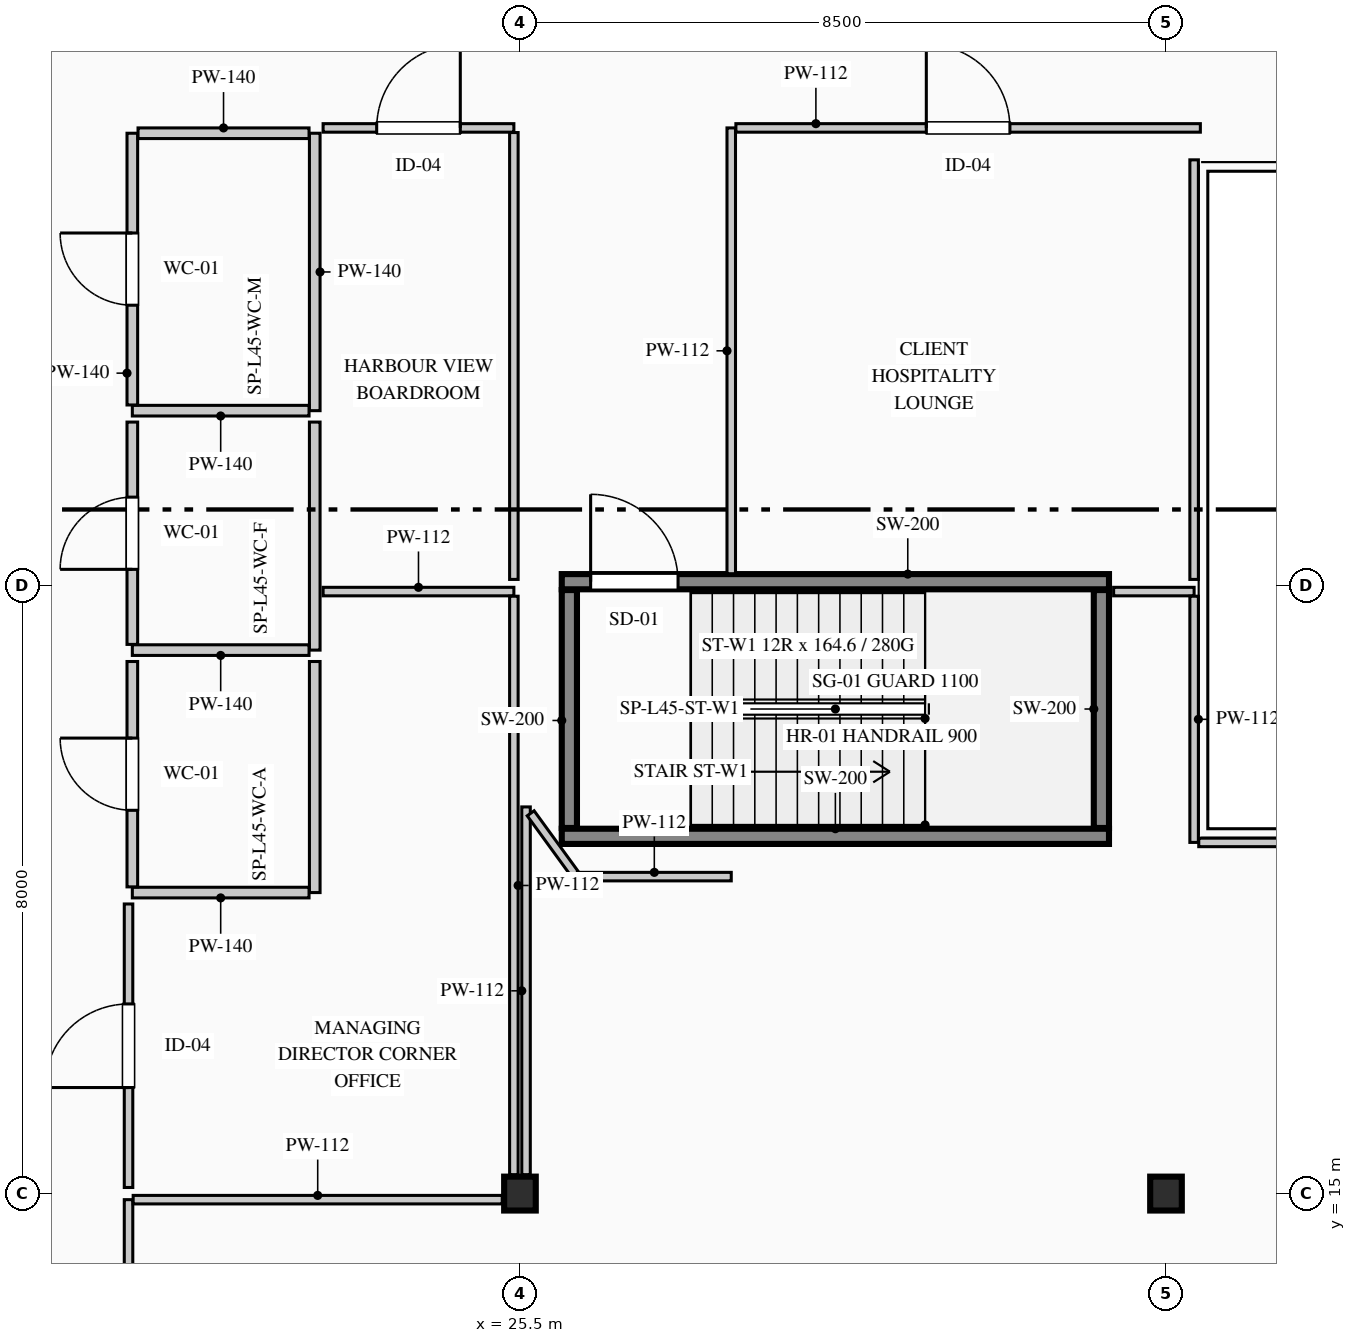
"""IFC4 building model, lengths in metres.
Left out: names, types, materials, properties, quantities, classifications, styles, units other than length and angle.
Written with IfcOpenShell. Run it as: python <this file> out.ifc"""

import sys

from ifc_helpers import new_model, si_unit, direction, frame, frame_2d, origin, origin_2d, place, context, subcontext, project, spatial, rectangle, i_section, extrude, element, fill, save


model = new_model("IFC4")
c1 = context("Model", 3, precision=1e-05, world=origin(), true_north=direction((0.0, 1.0)))
c2 = subcontext(c1, "Body", "Model", "MODEL_VIEW")
j1 = project(units=[si_unit("LENGTHUNIT", "METRE"), si_unit("PLANEANGLEUNIT", "RADIAN")], contexts=[c1])
p1 = place(None, origin())
s1 = spatial("IfcSite", under=j1, at=p1, CompositionType="ELEMENT")
p2 = place(p1, origin())
s2 = spatial("IfcBuilding", under=s1, at=p2, CompositionType="ELEMENT")
p3 = place(p2, frame((0.0, 0.0, 191.65)))
s3 = spatial("IfcBuildingStorey", under=s2, at=p3, CompositionType="ELEMENT", Elevation=191.65)
p4 = place(p3, frame((26.05, 19.7, 0.0), z_axis=(0.0, 0.0, 1.0), x_axis=(1.0, 0.0, 0.0)))
e1 = element("IfcWall", 1, at=p4, inside=s3, PredefinedType="SHEAR", context=c2, shape_type="SweptSolid", body=[
    extrude(rectangle(XDim=7.2, YDim=0.2, at=frame_2d((3.6, 0.0))), origin(), (0.0, 0.0, 1.0), 3.95),
])
p5 = place(p3, frame((26.05, 23.05, 0.0), z_axis=(0.0, 0.0, 1.0), x_axis=(1.0, 0.0, 0.0)))
e2 = element("IfcWall", 2, at=p5, inside=s3, PredefinedType="SHEAR", context=c2, shape_type="SweptSolid", body=[
    extrude(rectangle(XDim=7.2, YDim=0.2, at=frame_2d((3.6, 0.0))), origin(), (0.0, 0.0, 1.0), 3.95),
])
p6 = place(p5, frame((0.38, 0.0, 0.0)))
e3 = element("IfcOpeningElement", 3, at=p6, cuts=e2, PredefinedType="OPENING", context=c2, shape_type="SweptSolid", body=[
    extrude(rectangle(XDim=1.15, YDim=2.2, at=frame_2d((0.575, 1.1))), frame((0.0, 0.11, 0.0), z_axis=(0.0, -1.0, 0.0), x_axis=(1.0, 0.0, 0.0)), (0.0, 0.0, 1.0), 0.22),
])
for number, where, z_axis, x_axis in (
    (4, (26.15, 19.81, 0.0), (0.0, 0.0, 1.0), (0.0, 1.0, 0.0)),
    (5, (33.15, 19.81, 0.0), (0.0, 0.0, 1.0), (0.0, 1.0, 0.0)),
):
    element("IfcWall", number, at=place(p3, frame(where, z_axis=z_axis, x_axis=x_axis)), inside=s3, PredefinedType="SHEAR", context=c2, shape_type="SweptSolid", body=[
        extrude(rectangle(XDim=3.13, YDim=0.2, at=frame_2d((1.565, 0.0))), origin(), (0.0, 0.0, 1.0), 3.95),
    ])
for number, where, z_axis, x_axis in (
    (6, (25.5, 15.0, 0.0), (0.0, 0.0, 1.0), (1.0, 0.0, 0.0)),
    (7, (34.0, 15.0, 0.0), (0.0, 0.0, 1.0), (1.0, 0.0, 0.0)),
):
    element("IfcColumn", number, at=place(p3, frame(where, z_axis=z_axis, x_axis=x_axis)), inside=s3, PredefinedType="COLUMN", context=c2, shape_type="SweptSolid", body=[
        extrude(i_section(OverallWidth=0.416, OverallDepth=0.446, WebThickness=0.039, FlangeThickness=0.063, FilletRadius=0.015, at=origin_2d()), origin(), (0.0, 0.0, 1.0), 3.95),
    ])
p7 = place(p3, frame((22.8, 28.95, 0.0), z_axis=(0.0, 0.0, 1.0), x_axis=(0.0, -1.0, 0.0)))
e8 = element("IfcWall", 8, at=p7, inside=s3, PredefinedType="PARTITIONING", context=c2, shape_type="SweptSolid", body=[
    extrude(rectangle(XDim=3.65, YDim=0.14, at=frame_2d((1.825, 0.0))), origin(), (0.0, 0.0, 1.0), 3.385),
])
p8 = place(p3, frame((22.725, 25.3, 0.0), z_axis=(0.0, 0.0, 1.0), x_axis=(-1.0, 0.0, 0.0)))
e9 = element("IfcWall", 9, at=p8, inside=s3, PredefinedType="PARTITIONING", context=c2, shape_type="SweptSolid", body=[
    extrude(rectangle(XDim=2.325, YDim=0.14, at=frame_2d((1.163, 0.0))), origin(), (0.0, 0.0, 1.0), 3.7),
])
p9 = place(p3, frame((20.4, 25.375, 0.0), z_axis=(0.0, 0.0, 1.0), x_axis=(0.0, 1.0, 0.0)))
e10 = element("IfcWall", 10, at=p9, inside=s3, PredefinedType="PARTITIONING", context=c2, shape_type="SweptSolid", body=[
    extrude(rectangle(XDim=3.575, YDim=0.14, at=frame_2d((1.788, 0.0))), origin(), (0.0, 0.0, 1.0), 3.7),
])
p10 = place(p9, frame((1.312, 0.0, 0.0)))
e11 = element("IfcOpeningElement", 11, at=p10, cuts=e10, PredefinedType="OPENING", context=c2, shape_type="SweptSolid", body=[
    extrude(rectangle(XDim=0.95, YDim=2.15, at=frame_2d((0.475, 1.075))), frame((0.0, 0.08, 0.0), z_axis=(0.0, -1.0, 0.0), x_axis=(1.0, 0.0, 0.0)), (0.0, 0.0, 1.0), 0.16),
])
p11 = place(p3, frame((20.475, 28.95, 0.0), z_axis=(0.0, 0.0, 1.0), x_axis=(1.0, 0.0, 0.0)))
e12 = element("IfcWall", 12, at=p11, inside=s3, PredefinedType="PARTITIONING", context=c2, shape_type="SweptSolid", body=[
    extrude(rectangle(XDim=2.25, YDim=0.14, at=frame_2d((1.125, 0.0))), origin(), (0.0, 0.0, 1.0), 3.7),
])
p12 = place(p3, frame((22.8, 25.15, 0.0), z_axis=(0.0, 0.0, 1.0), x_axis=(0.0, -1.0, 0.0)))
e13 = element("IfcWall", 13, at=p12, inside=s3, PredefinedType="PARTITIONING", context=c2, shape_type="SweptSolid", body=[
    extrude(rectangle(XDim=3.0, YDim=0.14, at=frame_2d((1.5, 0.0))), origin(), (0.0, 0.0, 1.0), 3.385),
])
p13 = place(p3, frame((22.725, 22.15, 0.0), z_axis=(0.0, 0.0, 1.0), x_axis=(-1.0, 0.0, 0.0)))
e14 = element("IfcWall", 14, at=p13, inside=s3, PredefinedType="PARTITIONING", context=c2, shape_type="SweptSolid", body=[
    extrude(rectangle(XDim=2.325, YDim=0.14, at=frame_2d((1.163, 0.0))), origin(), (0.0, 0.0, 1.0), 3.7),
])
p14 = place(p3, frame((20.4, 22.225, 0.0), z_axis=(0.0, 0.0, 1.0), x_axis=(0.0, 1.0, 0.0)))
e15 = element("IfcWall", 15, at=p14, inside=s3, PredefinedType="PARTITIONING", context=c2, shape_type="SweptSolid", body=[
    extrude(rectangle(XDim=2.925, YDim=0.14, at=frame_2d((1.462, 0.0))), origin(), (0.0, 0.0, 1.0), 3.7),
])
p15 = place(p14, frame((0.988, 0.0, 0.0)))
e16 = element("IfcOpeningElement", 16, at=p15, cuts=e15, PredefinedType="OPENING", context=c2, shape_type="SweptSolid", body=[
    extrude(rectangle(XDim=0.95, YDim=2.15, at=frame_2d((0.475, 1.075))), frame((0.0, 0.08, 0.0), z_axis=(0.0, -1.0, 0.0), x_axis=(1.0, 0.0, 0.0)), (0.0, 0.0, 1.0), 0.16),
])
p16 = place(p3, frame((22.8, 22.0, 0.0), z_axis=(0.0, 0.0, 1.0), x_axis=(0.0, -1.0, 0.0)))
e17 = element("IfcWall", 17, at=p16, inside=s3, PredefinedType="PARTITIONING", context=c2, shape_type="SweptSolid", body=[
    extrude(rectangle(XDim=3.04, YDim=0.14, at=frame_2d((1.52, 0.0))), origin(), (0.0, 0.0, 1.0), 3.385),
])
p17 = place(p3, frame((22.725, 18.96, 0.0), z_axis=(0.0, 0.0, 1.0), x_axis=(-1.0, 0.0, 0.0)))
e18 = element("IfcWall", 18, at=p17, inside=s3, PredefinedType="PARTITIONING", context=c2, shape_type="SweptSolid", body=[
    extrude(rectangle(XDim=2.325, YDim=0.14, at=frame_2d((1.163, 0.0))), origin(), (0.0, 0.0, 1.0), 3.7),
])
p18 = place(p3, frame((20.4, 19.035, 0.0), z_axis=(0.0, 0.0, 1.0), x_axis=(0.0, 1.0, 0.0)))
e19 = element("IfcWall", 19, at=p18, inside=s3, PredefinedType="PARTITIONING", context=c2, shape_type="SweptSolid", body=[
    extrude(rectangle(XDim=2.965, YDim=0.14, at=frame_2d((1.482, 0.0))), origin(), (0.0, 0.0, 1.0), 3.7),
])
p19 = place(p18, frame((1.008, 0.0, 0.0)))
e20 = element("IfcOpeningElement", 20, at=p19, cuts=e19, PredefinedType="OPENING", context=c2, shape_type="SweptSolid", body=[
    extrude(rectangle(XDim=0.95, YDim=2.15, at=frame_2d((0.475, 1.075))), frame((0.0, 0.08, 0.0), z_axis=(0.0, -1.0, 0.0), x_axis=(1.0, 0.0, 0.0)), (0.0, 0.0, 1.0), 0.16),
])
p20 = place(p3, frame((20.35, 11.831, 0.0), z_axis=(0.0, 0.0, 1.0), x_axis=(0.0, 1.0, 0.0)))
e21 = element("IfcWall", 21, at=p20, inside=s3, PredefinedType="PARTITIONING", context=c2, shape_type="SweptSolid", body=[
    extrude(rectangle(XDim=3.089, YDim=0.112, at=frame_2d((1.544, 0.0))), origin(), (0.0, 0.0, 1.0), 3.7),
])
p21 = place(p3, frame((20.411, 14.92, 0.0), z_axis=(0.0, 0.0, 1.0), x_axis=(1.0, 0.0, 0.0)))
e22 = element("IfcWall", 22, at=p21, inside=s3, PredefinedType="PARTITIONING", context=c2, shape_type="SweptSolid", body=[
    extrude(rectangle(XDim=4.856, YDim=0.112, at=frame_2d((2.428, 0.0))), origin(), (0.0, 0.0, 1.0), 3.085),
])
p22 = place(p3, frame((25.58, 15.248, 0.0), z_axis=(0.0, 0.0, 1.0), x_axis=(0.0, 1.0, 0.0)))
e23 = element("IfcWall", 23, at=p22, inside=s3, PredefinedType="PARTITIONING", context=c2, shape_type="SweptSolid", body=[
    extrude(rectangle(XDim=4.839, YDim=0.112, at=frame_2d((2.419, 0.0))), origin(), (0.0, 0.0, 1.0), 2.885),
])
p23 = place(p3, frame((25.641, 20.003, 0.0), z_axis=(0.0, 0.0, 1.0), x_axis=(0.588143517869, -0.808756577957, 0.0)))
e24 = element("IfcWall", 24, at=p23, inside=s3, PredefinedType="PARTITIONING", context=c2, shape_type="SweptSolid", body=[
    extrude(rectangle(XDim=1.03, YDim=0.112, at=frame_2d((0.515, 0.0))), origin(), (0.0, 0.0, 1.0), 3.7),
])
p24 = place(p3, frame((26.256, 19.17, 0.0), z_axis=(0.0, 0.0, 1.0), x_axis=(1.0, 0.0, 0.0)))
e25 = element("IfcWall", 25, at=p24, inside=s3, PredefinedType="PARTITIONING", context=c2, shape_type="SweptSolid", body=[
    extrude(rectangle(XDim=2.024, YDim=0.112, at=frame_2d((1.012, 0.0))), origin(), (0.0, 0.0, 1.0), 3.385),
])
p25 = place(p3, frame((33.311, 22.92, 0.0), z_axis=(0.0, 0.0, 1.0), x_axis=(1.0, 0.0, 0.0)))
e26 = element("IfcWall", 26, at=p25, inside=s3, PredefinedType="PARTITIONING", context=c2, shape_type="SweptSolid", body=[
    extrude(rectangle(XDim=1.059, YDim=0.112, at=frame_2d((0.53, 0.0))), origin(), (0.0, 0.0, 1.0), 3.7),
])
p26 = place(p3, frame((34.37, 22.859, 0.0), z_axis=(0.0, 0.0, 1.0), x_axis=(0.0, -1.0, 0.0)))
e27 = element("IfcWall", 27, at=p26, inside=s3, PredefinedType="PARTITIONING", context=c2, shape_type="SweptSolid", body=[
    extrude(rectangle(XDim=3.239, YDim=0.112, at=frame_2d((1.619, 0.0))), origin(), (0.0, 0.0, 1.0), 3.7),
])
p27 = place(p3, frame((34.431, 19.62, 0.0), z_axis=(0.0, 0.0, 1.0), x_axis=(1.0, 0.0, 0.0)))
e28 = element("IfcWall", 28, at=p27, inside=s3, PredefinedType="PARTITIONING", context=c2, shape_type="SweptSolid", body=[
    extrude(rectangle(XDim=8.726, YDim=0.112, at=frame_2d((4.363, 0.0))), origin(), (0.0, 0.0, 1.0), 3.7),
])
p28 = place(p3, frame((22.91, 22.92, 0.0), z_axis=(0.0, 0.0, 1.0), x_axis=(1.0, 0.0, 0.0)))
e29 = element("IfcWall", 29, at=p28, inside=s3, PredefinedType="PARTITIONING", context=c2, shape_type="SweptSolid", body=[
    extrude(rectangle(XDim=2.51, YDim=0.112, at=frame_2d((1.255, 0.0))), origin(), (0.0, 0.0, 1.0), 3.7),
])
p29 = place(p3, frame((25.42, 22.859, 0.0), z_axis=(0.0, 0.0, 1.0), x_axis=(0.0, -1.0, 0.0)))
e30 = element("IfcWall", 30, at=p29, inside=s3, PredefinedType="PARTITIONING", context=c2, shape_type="SweptSolid", body=[
    extrude(rectangle(XDim=7.611, YDim=0.112, at=frame_2d((3.805, 0.0))), origin(), (0.0, 0.0, 1.0), 2.885),
])
p30 = place(p3, frame((20.35, 15.08, 0.0), z_axis=(0.0, 0.0, 1.0), x_axis=(0.0, 1.0, 0.0)))
e31 = element("IfcWall", 31, at=p30, inside=s3, PredefinedType="PARTITIONING", context=c2, shape_type="SweptSolid", body=[
    extrude(rectangle(XDim=3.73, YDim=0.112, at=frame_2d((1.865, 0.0))), origin(), (0.0, 0.0, 1.0), 3.7),
])
p31 = place(p30, frame((1.315, 0.0, 0.0)))
e32 = element("IfcOpeningElement", 32, at=p31, cuts=e31, PredefinedType="OPENING", context=c2, shape_type="SweptSolid", body=[
    extrude(rectangle(XDim=1.1, YDim=2.2, at=frame_2d((0.55, 1.1))), frame((0.0, 0.066, 0.0), z_axis=(0.0, -1.0, 0.0), x_axis=(1.0, 0.0, 0.0)), (0.0, 0.0, 1.0), 0.132),
])
p32 = place(p3, frame((22.91, 29.02, 0.0), z_axis=(0.0, 0.0, 1.0), x_axis=(1.0, 0.0, 0.0)))
e33 = element("IfcWall", 33, at=p32, inside=s3, PredefinedType="PARTITIONING", context=c2, shape_type="SweptSolid", body=[
    extrude(rectangle(XDim=2.51, YDim=0.112, at=frame_2d((1.255, 0.0))), origin(), (0.0, 0.0, 1.0), 3.7),
])
p33 = place(p32, frame((0.705, 0.0, 0.0)))
e34 = element("IfcOpeningElement", 34, at=p33, cuts=e33, PredefinedType="OPENING", context=c2, shape_type="SweptSolid", body=[
    extrude(rectangle(XDim=1.1, YDim=2.2, at=frame_2d((0.55, 1.1))), frame((0.0, 0.066, 0.0), z_axis=(0.0, -1.0, 0.0), x_axis=(1.0, 0.0, 0.0)), (0.0, 0.0, 1.0), 0.132),
])
p34 = place(p3, frame((25.42, 28.959, 0.0), z_axis=(0.0, 0.0, 1.0), x_axis=(0.0, -1.0, 0.0)))
e35 = element("IfcWall", 35, at=p34, inside=s3, PredefinedType="PARTITIONING", context=c2, shape_type="SweptSolid", body=[
    extrude(rectangle(XDim=5.879, YDim=0.112, at=frame_2d((2.939, 0.0))), origin(), (0.0, 0.0, 1.0), 2.885),
])
p35 = place(p3, frame((34.37, 28.6, 0.0), z_axis=(0.0, 0.0, 1.0), x_axis=(0.0, -1.0, 0.0)))
e36 = element("IfcWall", 36, at=p35, inside=s3, PredefinedType="PARTITIONING", context=c2, shape_type="SweptSolid", body=[
    extrude(rectangle(XDim=5.52, YDim=0.112, at=frame_2d((2.76, 0.0))), origin(), (0.0, 0.0, 1.0), 3.7),
])
p36 = place(p3, frame((28.28, 23.155, 0.0), z_axis=(0.0, 0.0, 1.0), x_axis=(0.0, 1.0, 0.0)))
e37 = element("IfcWall", 37, at=p36, inside=s3, PredefinedType="PARTITIONING", context=c2, shape_type="SweptSolid", body=[
    extrude(rectangle(XDim=5.865, YDim=0.112, at=frame_2d((2.933, 0.0))), origin(), (0.0, 0.0, 1.0), 3.7),
])
p37 = place(p3, frame((28.341, 29.02, 0.0), z_axis=(0.0, 0.0, 1.0), x_axis=(1.0, 0.0, 0.0)))
e38 = element("IfcWall", 38, at=p37, inside=s3, PredefinedType="PARTITIONING", context=c2, shape_type="SweptSolid", body=[
    extrude(rectangle(XDim=6.111, YDim=0.112, at=frame_2d((3.055, 0.0))), origin(), (0.0, 0.0, 1.0), 3.385),
])
p38 = place(p37, frame((2.506, 0.0, 0.0)))
e39 = element("IfcOpeningElement", 39, at=p38, cuts=e38, PredefinedType="OPENING", context=c2, shape_type="SweptSolid", body=[
    extrude(rectangle(XDim=1.1, YDim=2.2, at=frame_2d((0.55, 1.1))), frame((0.0, 0.066, 0.0), z_axis=(0.0, -1.0, 0.0), x_axis=(1.0, 0.0, 0.0)), (0.0, 0.0, 1.0), 0.132),
])
p39 = place(p6, origin())
e40 = element("IfcDoor", 40, at=p39, inside=s3, OperationType="SINGLE_SWING_LEFT", PredefinedType="DOOR", context=c2, shape_type="SweptSolid", body=[
    extrude(rectangle(XDim=1.15, YDim=2.2, at=frame_2d((0.575, 1.1))), frame((0.0, 0.025, 0.0), z_axis=(0.0, -1.0, 0.0), x_axis=(1.0, 0.0, 0.0)), (0.0, 0.0, 1.0), 0.05),
])
fill(e3, e40)
p40 = place(p10, origin())
e41 = element("IfcDoor", 41, at=p40, inside=s3, OperationType="SINGLE_SWING_RIGHT", PredefinedType="DOOR", context=c2, shape_type="SweptSolid", body=[
    extrude(rectangle(XDim=0.95, YDim=2.15, at=frame_2d((0.475, 1.075))), frame((0.0, 0.025, 0.0), z_axis=(0.0, -1.0, 0.0), x_axis=(1.0, 0.0, 0.0)), (0.0, 0.0, 1.0), 0.05),
])
fill(e11, e41)
p41 = place(p15, origin())
e42 = element("IfcDoor", 42, at=p41, inside=s3, OperationType="SINGLE_SWING_LEFT", PredefinedType="DOOR", context=c2, shape_type="SweptSolid", body=[
    extrude(rectangle(XDim=0.95, YDim=2.15, at=frame_2d((0.475, 1.075))), frame((0.0, 0.025, 0.0), z_axis=(0.0, -1.0, 0.0), x_axis=(1.0, 0.0, 0.0)), (0.0, 0.0, 1.0), 0.05),
])
fill(e16, e42)
p42 = place(p19, origin())
e43 = element("IfcDoor", 43, at=p42, inside=s3, OperationType="SINGLE_SWING_RIGHT", PredefinedType="DOOR", context=c2, shape_type="SweptSolid", body=[
    extrude(rectangle(XDim=0.95, YDim=2.15, at=frame_2d((0.475, 1.075))), frame((0.0, 0.025, 0.0), z_axis=(0.0, -1.0, 0.0), x_axis=(1.0, 0.0, 0.0)), (0.0, 0.0, 1.0), 0.05),
])
fill(e20, e43)
p43 = place(p31, origin())
e44 = element("IfcDoor", 44, at=p43, inside=s3, OperationType="SINGLE_SWING_LEFT", PredefinedType="DOOR", context=c2, shape_type="SweptSolid", body=[
    extrude(rectangle(XDim=1.1, YDim=2.2, at=frame_2d((0.55, 1.1))), frame((0.0, 0.025, 0.0), z_axis=(0.0, -1.0, 0.0), x_axis=(1.0, 0.0, 0.0)), (0.0, 0.0, 1.0), 0.05),
])
fill(e32, e44)
p44 = place(p33, origin())
e45 = element("IfcDoor", 45, at=p44, inside=s3, OperationType="SINGLE_SWING_RIGHT", PredefinedType="DOOR", context=c2, shape_type="SweptSolid", body=[
    extrude(rectangle(XDim=1.1, YDim=2.2, at=frame_2d((0.55, 1.1))), frame((0.0, 0.025, 0.0), z_axis=(0.0, -1.0, 0.0), x_axis=(1.0, 0.0, 0.0)), (0.0, 0.0, 1.0), 0.05),
])
fill(e34, e45)
p45 = place(p38, origin())
e46 = element("IfcDoor", 46, at=p45, inside=s3, OperationType="SINGLE_SWING_LEFT", PredefinedType="DOOR", context=c2, shape_type="SweptSolid", body=[
    extrude(rectangle(XDim=1.1, YDim=2.2, at=frame_2d((0.55, 1.1))), frame((0.0, 0.025, 0.0), z_axis=(0.0, -1.0, 0.0), x_axis=(1.0, 0.0, 0.0)), (0.0, 0.0, 1.0), 0.05),
])
fill(e39, e46)
save(model, sys.argv[1])
